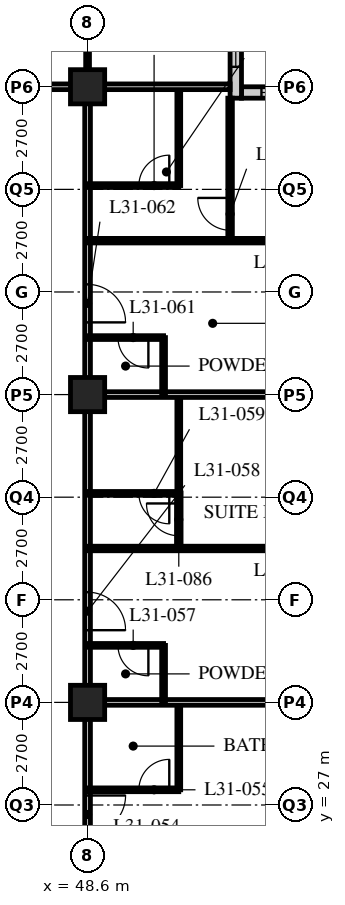
"""IFC4 building model, lengths in metres.
Left out: names, types, materials, properties, quantities, classifications, styles, units other than length and angle.
Written with IfcOpenShell. Run it as: python <this file> out.ifc"""

import sys

from ifc_helpers import new_model, si_unit, direction, frame, frame_2d, origin, origin_2d, place, context, subcontext, project, spatial, rectangle, hollow_rectangle, extrude, element, fill, save


model = new_model("IFC4")
c1 = context("Model", 3, precision=1e-05, world=origin(), true_north=direction((0.0, 1.0)))
c2 = subcontext(c1, "Body", "Model", "MODEL_VIEW")
j1 = project(units=[si_unit("LENGTHUNIT", "METRE"), si_unit("PLANEANGLEUNIT", "RADIAN")], contexts=[c1])
p1 = place(None, origin())
s1 = spatial("IfcSite", under=j1, at=p1, CompositionType="ELEMENT")
p2 = place(p1, origin())
s2 = spatial("IfcBuilding", under=s1, at=p2, CompositionType="ELEMENT")
p3 = place(p2, frame((0.0, 0.0, 123.8)))
s3 = spatial("IfcBuildingStorey", under=s2, at=p3, CompositionType="ELEMENT", Elevation=123.8)
for number, where, z_axis, x_axis in (
    (1, (48.6, 29.7, 0.0), (0.0, 0.0, 1.0), (1.0, 0.0, 0.0)),
    (2, (48.6, 37.8, 0.0), (0.0, 0.0, 1.0), (1.0, 0.0, 0.0)),
    (3, (48.6, 45.9, 0.0), (0.0, 0.0, 1.0), (1.0, 0.0, 0.0)),
):
    element("IfcColumn", number, at=place(p3, frame(where, z_axis=z_axis, x_axis=x_axis)), inside=s3, PredefinedType="COLUMN", context=c2, shape_type="SweptSolid", body=[
        extrude(hollow_rectangle(XDim=0.9, YDim=0.9, WallThickness=0.09, at=origin_2d()), origin(), (0.0, 0.0, 1.0), 3.4),
    ])
p4 = place(p3, frame((56.4, 45.75, 0.0), z_axis=(0.0, 0.0, 1.0), x_axis=(-1.0, 0.0, 0.0)))
e4 = element("IfcWall", 4, at=p4, inside=s3, PredefinedType="SOLIDWALL", context=c2, shape_type="SweptSolid", body=[
    extrude(rectangle(XDim=3.75, YDim=0.3, at=frame_2d((1.875, 0.0))), origin(), (0.0, 0.0, 1.0), 3.19),
])
p5 = place(p4, frame((0.225, 0.0, 0.9)))
e5 = element("IfcOpeningElement", 5, at=p5, cuts=e4, PredefinedType="OPENING", context=c2, shape_type="SweptSolid", body=[
    extrude(rectangle(XDim=3.0, YDim=1.5, at=frame_2d((1.5, 0.75))), frame((0.0, 0.16, 0.0), z_axis=(0.0, -1.0, 0.0), x_axis=(1.0, 0.0, 0.0)), (0.0, 0.0, 1.0), 0.32),
])
p6 = place(p3, frame((52.5, 45.6, 0.0), z_axis=(0.0, 0.0, 1.0), x_axis=(0.0, 1.0, 0.0)))
e6 = element("IfcWall", 6, at=p6, inside=s3, PredefinedType="SOLIDWALL", context=c2, shape_type="SweptSolid", body=[
    extrude(rectangle(XDim=4.35, YDim=0.3, at=frame_2d((2.175, 0.0))), origin(), (0.0, 0.0, 1.0), 3.19),
])
p7 = place(p6, frame((0.825, 0.0, 0.9)))
e7 = element("IfcOpeningElement", 7, at=p7, cuts=e6, PredefinedType="OPENING", context=c2, shape_type="SweptSolid", body=[
    extrude(rectangle(XDim=3.0, YDim=1.5, at=frame_2d((1.5, 0.75))), frame((0.0, 0.16, 0.0), z_axis=(0.0, -1.0, 0.0), x_axis=(1.0, 0.0, 0.0)), (0.0, 0.0, 1.0), 0.32),
])
p8 = place(p3, frame((8.1, 45.9, 0.0), z_axis=(0.0, 0.0, 1.0), x_axis=(1.0, 0.0, 0.0)))
e8 = element("IfcWall", 8, at=p8, inside=s3, PredefinedType="PARTITIONING", context=c2, shape_type="SweptSolid", body=[
    extrude(rectangle(XDim=40.5, YDim=0.15, at=frame_2d((20.25, 0.0))), origin(), (0.0, 0.0, 1.0), 2.578),
])
p9 = place(p8, frame((9.625, 0.0, 0.0)))
e9 = element("IfcOpeningElement", 9, at=p9, cuts=e8, PredefinedType="OPENING", context=c2, shape_type="SweptSolid", body=[
    extrude(rectangle(XDim=1.0, YDim=2.1, at=frame_2d((0.5, 1.05))), frame((0.0, 0.085, 0.0), z_axis=(0.0, -1.0, 0.0), x_axis=(1.0, 0.0, 0.0)), (0.0, 0.0, 1.0), 0.17),
])
p10 = place(p8, frame((21.65, 0.0, 0.0)))
e10 = element("IfcOpeningElement", 10, at=p10, cuts=e8, PredefinedType="OPENING", context=c2, shape_type="SweptSolid", body=[
    extrude(rectangle(XDim=1.0, YDim=2.1, at=frame_2d((0.5, 1.05))), frame((0.0, 0.085, 0.0), z_axis=(0.0, -1.0, 0.0), x_axis=(1.0, 0.0, 0.0)), (0.0, 0.0, 1.0), 0.17),
])
p11 = place(p8, frame((26.75, 0.0, 0.0)))
e11 = element("IfcOpeningElement", 11, at=p11, cuts=e8, PredefinedType="OPENING", context=c2, shape_type="SweptSolid", body=[
    extrude(rectangle(XDim=1.0, YDim=2.1, at=frame_2d((0.5, 1.05))), frame((0.0, 0.085, 0.0), z_axis=(0.0, -1.0, 0.0), x_axis=(1.0, 0.0, 0.0)), (0.0, 0.0, 1.0), 0.17),
])
p12 = place(p8, frame((28.95, 0.0, 0.0)))
e12 = element("IfcOpeningElement", 12, at=p12, cuts=e8, PredefinedType="OPENING", context=c2, shape_type="SweptSolid", body=[
    extrude(rectangle(XDim=1.0, YDim=2.1, at=frame_2d((0.5, 1.05))), frame((0.0, 0.085, 0.0), z_axis=(0.0, -1.0, 0.0), x_axis=(1.0, 0.0, 0.0)), (0.0, 0.0, 1.0), 0.17),
])
p13 = place(p8, frame((34.85, 0.0, 0.0)))
e13 = element("IfcOpeningElement", 13, at=p13, cuts=e8, PredefinedType="OPENING", context=c2, shape_type="SweptSolid", body=[
    extrude(rectangle(XDim=1.0, YDim=2.1, at=frame_2d((0.5, 1.05))), frame((0.0, 0.085, 0.0), z_axis=(0.0, -1.0, 0.0), x_axis=(1.0, 0.0, 0.0)), (0.0, 0.0, 1.0), 0.17),
])
p14 = place(p8, frame((36.875, 0.0, 0.0)))
e14 = element("IfcOpeningElement", 14, at=p14, cuts=e8, PredefinedType="OPENING", context=c2, shape_type="SweptSolid", body=[
    extrude(rectangle(XDim=1.0, YDim=2.1, at=frame_2d((0.5, 1.05))), frame((0.0, 0.085, 0.0), z_axis=(0.0, -1.0, 0.0), x_axis=(1.0, 0.0, 0.0)), (0.0, 0.0, 1.0), 0.17),
])
p15 = place(p8, frame((2.625, 0.0, 0.0)))
e15 = element("IfcOpeningElement", 15, at=p15, cuts=e8, PredefinedType="OPENING", context=c2, shape_type="SweptSolid", body=[
    extrude(rectangle(XDim=1.0, YDim=2.1, at=frame_2d((0.5, 1.05))), frame((0.0, 0.085, 0.0), z_axis=(0.0, -1.0, 0.0), x_axis=(1.0, 0.0, 0.0)), (0.0, 0.0, 1.0), 0.17),
])
p16 = place(p3, frame((48.6, 21.6, 0.0), z_axis=(0.0, 0.0, 1.0), x_axis=(0.0, 1.0, 0.0)))
e16 = element("IfcWall", 16, at=p16, inside=s3, PredefinedType="PARTITIONING", context=c2, shape_type="SweptSolid", body=[
    extrude(rectangle(XDim=24.3, YDim=0.15, at=frame_2d((12.15, 0.0))), origin(), (0.0, 0.0, 1.0), 2.578),
])
p17 = place(p16, frame((2.75, 0.0, 0.0)))
e17 = element("IfcOpeningElement", 17, at=p17, cuts=e16, PredefinedType="OPENING", context=c2, shape_type="SweptSolid", body=[
    extrude(rectangle(XDim=1.0, YDim=2.1, at=frame_2d((0.5, 1.05))), frame((0.0, 0.085, 0.0), z_axis=(0.0, -1.0, 0.0), x_axis=(1.0, 0.0, 0.0)), (0.0, 0.0, 1.0), 0.17),
])
p18 = place(p16, frame((4.65, 0.0, 0.0)))
e18 = element("IfcOpeningElement", 18, at=p18, cuts=e16, PredefinedType="OPENING", context=c2, shape_type="SweptSolid", body=[
    extrude(rectangle(XDim=1.0, YDim=2.1, at=frame_2d((0.5, 1.05))), frame((0.0, 0.085, 0.0), z_axis=(0.0, -1.0, 0.0), x_axis=(1.0, 0.0, 0.0)), (0.0, 0.0, 1.0), 0.17),
])
p19 = place(p16, frame((10.0, 0.0, 0.0)))
e19 = element("IfcOpeningElement", 19, at=p19, cuts=e16, PredefinedType="OPENING", context=c2, shape_type="SweptSolid", body=[
    extrude(rectangle(XDim=1.0, YDim=2.1, at=frame_2d((0.5, 1.05))), frame((0.0, 0.085, 0.0), z_axis=(0.0, -1.0, 0.0), x_axis=(1.0, 0.0, 0.0)), (0.0, 0.0, 1.0), 0.17),
])
p20 = place(p16, frame((18.1, 0.0, 0.0)))
e20 = element("IfcOpeningElement", 20, at=p20, cuts=e16, PredefinedType="OPENING", context=c2, shape_type="SweptSolid", body=[
    extrude(rectangle(XDim=1.0, YDim=2.1, at=frame_2d((0.5, 1.05))), frame((0.0, 0.085, 0.0), z_axis=(0.0, -1.0, 0.0), x_axis=(1.0, 0.0, 0.0)), (0.0, 0.0, 1.0), 0.17),
])
p21 = place(p3, frame((51.0, 27.4, 0.0), z_axis=(0.0, 0.0, 1.0), x_axis=(0.0, 1.0, 0.0)))
e21 = element("IfcWall", 21, at=p21, inside=s3, PredefinedType="PARTITIONING", context=c2, shape_type="SweptSolid", body=[
    extrude(rectangle(XDim=2.3, YDim=0.1, at=frame_2d((1.15, 0.0))), origin(), (0.0, 0.0, 1.0), 3.19),
])
p22 = place(p3, frame((48.6, 27.4, 0.0), z_axis=(0.0, 0.0, 1.0), x_axis=(1.0, 0.0, 0.0)))
e22 = element("IfcWall", 22, at=p22, inside=s3, PredefinedType="PARTITIONING", context=c2, shape_type="SweptSolid", body=[
    extrude(rectangle(XDim=2.4, YDim=0.1, at=frame_2d((1.2, 0.0))), origin(), (0.0, 0.0, 1.0), 3.19),
])
p23 = place(p22, frame((1.35, 0.0, 0.0)))
e23 = element("IfcOpeningElement", 23, at=p23, cuts=e22, PredefinedType="OPENING", context=c2, shape_type="SweptSolid", body=[
    extrude(rectangle(XDim=0.8, YDim=2.1, at=frame_2d((0.4, 1.05))), frame((0.0, 0.06, 0.0), z_axis=(0.0, -1.0, 0.0), x_axis=(1.0, 0.0, 0.0)), (0.0, 0.0, 1.0), 0.12),
])
p24 = place(p3, frame((48.6, 29.7, 0.0), z_axis=(0.0, 0.0, 1.0), x_axis=(1.0, 0.0, 0.0)))
e24 = element("IfcWall", 24, at=p24, inside=s3, PredefinedType="PARTITIONING", context=c2, shape_type="SweptSolid", body=[
    extrude(rectangle(XDim=7.8, YDim=0.15, at=frame_2d((3.9, 0.0))), origin(), (0.0, 0.0, 1.0), 2.578),
])
p25 = place(p3, frame((50.6, 29.7, 0.0), z_axis=(0.0, 0.0, 1.0), x_axis=(0.0, 1.0, 0.0)))
e25 = element("IfcWall", 25, at=p25, inside=s3, PredefinedType="PARTITIONING", context=c2, shape_type="SweptSolid", body=[
    extrude(rectangle(XDim=1.5, YDim=0.1, at=frame_2d((0.75, 0.0))), origin(), (0.0, 0.0, 1.0), 3.19),
])
p26 = place(p3, frame((48.6, 31.2, 0.0), z_axis=(0.0, 0.0, 1.0), x_axis=(1.0, 0.0, 0.0)))
e26 = element("IfcWall", 26, at=p26, inside=s3, PredefinedType="PARTITIONING", context=c2, shape_type="SweptSolid", body=[
    extrude(rectangle(XDim=2.0, YDim=0.1, at=frame_2d((1.0, 0.0))), origin(), (0.0, 0.0, 1.0), 3.19),
])
p27 = place(p26, frame((0.8, 0.0, 0.0)))
e27 = element("IfcOpeningElement", 27, at=p27, cuts=e26, PredefinedType="OPENING", context=c2, shape_type="SweptSolid", body=[
    extrude(rectangle(XDim=0.8, YDim=2.1, at=frame_2d((0.4, 1.05))), frame((0.0, 0.06, 0.0), z_axis=(0.0, -1.0, 0.0), x_axis=(1.0, 0.0, 0.0)), (0.0, 0.0, 1.0), 0.12),
])
p28 = place(p3, frame((51.0, 35.2, 0.0), z_axis=(0.0, 0.0, 1.0), x_axis=(0.0, 1.0, 0.0)))
e28 = element("IfcWall", 28, at=p28, inside=s3, PredefinedType="PARTITIONING", context=c2, shape_type="SweptSolid", body=[
    extrude(rectangle(XDim=2.6, YDim=0.1, at=frame_2d((1.3, 0.0))), origin(), (0.0, 0.0, 1.0), 3.19),
])
p29 = place(p3, frame((48.6, 35.2, 0.0), z_axis=(0.0, 0.0, 1.0), x_axis=(1.0, 0.0, 0.0)))
e29 = element("IfcWall", 29, at=p29, inside=s3, PredefinedType="PARTITIONING", context=c2, shape_type="SweptSolid", body=[
    extrude(rectangle(XDim=2.4, YDim=0.1, at=frame_2d((1.2, 0.0))), origin(), (0.0, 0.0, 1.0), 3.19),
])
p30 = place(p29, frame((1.35, 0.0, 0.0)))
e30 = element("IfcOpeningElement", 30, at=p30, cuts=e29, PredefinedType="OPENING", context=c2, shape_type="SweptSolid", body=[
    extrude(rectangle(XDim=0.8, YDim=2.1, at=frame_2d((0.4, 1.05))), frame((0.0, 0.06, 0.0), z_axis=(0.0, -1.0, 0.0), x_axis=(1.0, 0.0, 0.0)), (0.0, 0.0, 1.0), 0.12),
])
p31 = place(p3, frame((48.6, 33.75, 0.0), z_axis=(0.0, 0.0, 1.0), x_axis=(1.0, 0.0, 0.0)))
e31 = element("IfcWall", 31, at=p31, inside=s3, PredefinedType="PARTITIONING", context=c2, shape_type="SweptSolid", body=[
    extrude(rectangle(XDim=7.8, YDim=0.12, at=frame_2d((3.9, 0.0))), origin(), (0.0, 0.0, 1.0), 3.19),
])
p32 = place(p31, frame((4.825, 0.0, 0.0)))
e32 = element("IfcOpeningElement", 32, at=p32, cuts=e31, PredefinedType="OPENING", context=c2, shape_type="SweptSolid", body=[
    extrude(rectangle(XDim=0.85, YDim=2.1, at=frame_2d((0.425, 1.05))), frame((0.0, 0.07, 0.0), z_axis=(0.0, -1.0, 0.0), x_axis=(1.0, 0.0, 0.0)), (0.0, 0.0, 1.0), 0.14),
])
p33 = place(p3, frame((48.6, 37.8, 0.0), z_axis=(0.0, 0.0, 1.0), x_axis=(1.0, 0.0, 0.0)))
e33 = element("IfcWall", 33, at=p33, inside=s3, PredefinedType="PARTITIONING", context=c2, shape_type="SweptSolid", body=[
    extrude(rectangle(XDim=7.8, YDim=0.15, at=frame_2d((3.9, 0.0))), origin(), (0.0, 0.0, 1.0), 2.578),
])
p34 = place(p3, frame((50.6, 37.8, 0.0), z_axis=(0.0, 0.0, 1.0), x_axis=(0.0, 1.0, 0.0)))
e34 = element("IfcWall", 34, at=p34, inside=s3, PredefinedType="PARTITIONING", context=c2, shape_type="SweptSolid", body=[
    extrude(rectangle(XDim=1.5, YDim=0.1, at=frame_2d((0.75, 0.0))), origin(), (0.0, 0.0, 1.0), 3.19),
])
p35 = place(p3, frame((48.6, 39.3, 0.0), z_axis=(0.0, 0.0, 1.0), x_axis=(1.0, 0.0, 0.0)))
e35 = element("IfcWall", 35, at=p35, inside=s3, PredefinedType="PARTITIONING", context=c2, shape_type="SweptSolid", body=[
    extrude(rectangle(XDim=2.0, YDim=0.1, at=frame_2d((1.0, 0.0))), origin(), (0.0, 0.0, 1.0), 3.19),
])
p36 = place(p35, frame((0.8, 0.0, 0.0)))
e36 = element("IfcOpeningElement", 36, at=p36, cuts=e35, PredefinedType="OPENING", context=c2, shape_type="SweptSolid", body=[
    extrude(rectangle(XDim=0.8, YDim=2.1, at=frame_2d((0.4, 1.05))), frame((0.0, 0.06, 0.0), z_axis=(0.0, -1.0, 0.0), x_axis=(1.0, 0.0, 0.0)), (0.0, 0.0, 1.0), 0.12),
])
p37 = place(p3, frame((51.0, 43.3, 0.0), z_axis=(0.0, 0.0, 1.0), x_axis=(0.0, 1.0, 0.0)))
e37 = element("IfcWall", 37, at=p37, inside=s3, PredefinedType="PARTITIONING", context=c2, shape_type="SweptSolid", body=[
    extrude(rectangle(XDim=2.6, YDim=0.1, at=frame_2d((1.3, 0.0))), origin(), (0.0, 0.0, 1.0), 3.19),
])
p38 = place(p3, frame((48.6, 43.3, 0.0), z_axis=(0.0, 0.0, 1.0), x_axis=(1.0, 0.0, 0.0)))
e38 = element("IfcWall", 38, at=p38, inside=s3, PredefinedType="PARTITIONING", context=c2, shape_type="SweptSolid", body=[
    extrude(rectangle(XDim=2.4, YDim=0.1, at=frame_2d((1.2, 0.0))), origin(), (0.0, 0.0, 1.0), 3.19),
])
p39 = place(p38, frame((1.35, 0.0, 0.0)))
e39 = element("IfcOpeningElement", 39, at=p39, cuts=e38, PredefinedType="OPENING", context=c2, shape_type="SweptSolid", body=[
    extrude(rectangle(XDim=0.8, YDim=2.1, at=frame_2d((0.4, 1.05))), frame((0.0, 0.06, 0.0), z_axis=(0.0, -1.0, 0.0), x_axis=(1.0, 0.0, 0.0)), (0.0, 0.0, 1.0), 0.12),
])
p40 = place(p3, frame((48.6, 41.85, 0.0), z_axis=(0.0, 0.0, 1.0), x_axis=(1.0, 0.0, 0.0)))
e40 = element("IfcWall", 40, at=p40, inside=s3, PredefinedType="PARTITIONING", context=c2, shape_type="SweptSolid", body=[
    extrude(rectangle(XDim=7.8, YDim=0.12, at=frame_2d((3.9, 0.0))), origin(), (0.0, 0.0, 1.0), 3.19),
])
p41 = place(p40, frame((4.825, 0.0, 0.0)))
e41 = element("IfcOpeningElement", 41, at=p41, cuts=e40, PredefinedType="OPENING", context=c2, shape_type="SweptSolid", body=[
    extrude(rectangle(XDim=0.85, YDim=2.1, at=frame_2d((0.425, 1.05))), frame((0.0, 0.07, 0.0), z_axis=(0.0, -1.0, 0.0), x_axis=(1.0, 0.0, 0.0)), (0.0, 0.0, 1.0), 0.14),
])
p42 = place(p3, frame((48.6, 45.9, 0.0), z_axis=(0.0, 0.0, 1.0), x_axis=(0.0, 1.0, 0.0)))
e42 = element("IfcWall", 42, at=p42, inside=s3, PredefinedType="PARTITIONING", context=c2, shape_type="SweptSolid", body=[
    extrude(rectangle(XDim=2.4, YDim=0.1, at=frame_2d((1.2, 0.0))), origin(), (0.0, 0.0, 1.0), 2.578),
])
p43 = place(p3, frame((48.6, 45.9, 0.0), z_axis=(0.0, 0.0, 1.0), x_axis=(1.0, 0.0, 0.0)))
e43 = element("IfcWall", 43, at=p43, inside=s3, PredefinedType="PARTITIONING", context=c2, shape_type="SweptSolid", body=[
    extrude(rectangle(XDim=3.75, YDim=0.15, at=frame_2d((1.875, 0.0))), origin(), (0.0, 0.0, 1.0), 2.578),
])
p44 = place(p3, frame((51.0, 35.21, 0.0), z_axis=(0.0, 0.0, 1.0), x_axis=(0.0, -1.0, 0.0)))
e44 = element("IfcWall", 44, at=p44, inside=s3, PredefinedType="PARTITIONING", context=c2, shape_type="SweptSolid", body=[
    extrude(rectangle(XDim=1.46, YDim=0.12, at=frame_2d((0.73, 0.0))), origin(), (0.0, 0.0, 1.0), 3.19),
])
p45 = place(p44, frame((0.275, 0.0, 0.0)))
e45 = element("IfcOpeningElement", 45, at=p45, cuts=e44, PredefinedType="OPENING", context=c2, shape_type="SweptSolid", body=[
    extrude(rectangle(XDim=0.85, YDim=2.1, at=frame_2d((0.425, 1.05))), frame((0.0, 0.07, 0.0), z_axis=(0.0, -1.0, 0.0), x_axis=(1.0, 0.0, 0.0)), (0.0, 0.0, 1.0), 0.14),
])
p46 = place(p3, frame((52.35, 45.6, 0.0), z_axis=(0.0, 0.0, 1.0), x_axis=(0.0, -1.0, 0.0)))
e46 = element("IfcWall", 46, at=p46, inside=s3, PredefinedType="PARTITIONING", context=c2, shape_type="SweptSolid", body=[
    extrude(rectangle(XDim=3.75, YDim=0.12, at=frame_2d((1.875, 0.0))), origin(), (0.0, 0.0, 1.0), 3.19),
])
p47 = place(p46, frame((2.625, 0.0, 0.0)))
e47 = element("IfcOpeningElement", 47, at=p47, cuts=e46, PredefinedType="OPENING", context=c2, shape_type="SweptSolid", body=[
    extrude(rectangle(XDim=0.85, YDim=2.1, at=frame_2d((0.425, 1.05))), frame((0.0, 0.07, 0.0), z_axis=(0.0, -1.0, 0.0), x_axis=(1.0, 0.0, 0.0)), (0.0, 0.0, 1.0), 0.14),
])
p48 = place(p5, origin())
e48 = element("IfcWindow", 48, at=p48, inside=s3, PartitioningType="SINGLE_PANEL", PredefinedType="WINDOW", context=c2, shape_type="SweptSolid", body=[
    extrude(rectangle(XDim=3.0, YDim=1.5, at=frame_2d((1.5, 0.75))), frame((0.0, 0.03, 0.0), z_axis=(0.0, -1.0, 0.0), x_axis=(1.0, 0.0, 0.0)), (0.0, 0.0, 1.0), 0.06),
])
fill(e5, e48)
p49 = place(p7, origin())
e49 = element("IfcWindow", 49, at=p49, inside=s3, PartitioningType="SINGLE_PANEL", PredefinedType="WINDOW", context=c2, shape_type="SweptSolid", body=[
    extrude(rectangle(XDim=3.0, YDim=1.5, at=frame_2d((1.5, 0.75))), frame((0.0, 0.03, 0.0), z_axis=(0.0, -1.0, 0.0), x_axis=(1.0, 0.0, 0.0)), (0.0, 0.0, 1.0), 0.06),
])
fill(e7, e49)
p50 = place(p23, origin())
e50 = element("IfcDoor", 50, at=p50, inside=s3, OperationType="SINGLE_SWING_RIGHT", PredefinedType="DOOR", context=c2, shape_type="SweptSolid", body=[
    extrude(rectangle(XDim=0.8, YDim=2.1, at=frame_2d((0.4, 1.05))), frame((0.0, 0.025, 0.0), z_axis=(0.0, -1.0, 0.0), x_axis=(1.0, 0.0, 0.0)), (0.0, 0.0, 1.0), 0.05),
])
fill(e23, e50)
p51 = place(p18, origin())
e51 = element("IfcDoor", 51, at=p51, inside=s3, OperationType="SINGLE_SWING_LEFT", PredefinedType="DOOR", context=c2, shape_type="SweptSolid", body=[
    extrude(rectangle(XDim=1.0, YDim=2.1, at=frame_2d((0.5, 1.05))), frame((0.0, 0.025, 0.0), z_axis=(0.0, -1.0, 0.0), x_axis=(1.0, 0.0, 0.0)), (0.0, 0.0, 1.0), 0.05),
])
fill(e18, e51)
p52 = place(p27, origin())
e52 = element("IfcDoor", 52, at=p52, inside=s3, OperationType="SINGLE_SWING_LEFT", PredefinedType="DOOR", context=c2, shape_type="SweptSolid", body=[
    extrude(rectangle(XDim=0.8, YDim=2.1, at=frame_2d((0.4, 1.05))), frame((0.0, 0.025, 0.0), z_axis=(0.0, -1.0, 0.0), x_axis=(1.0, 0.0, 0.0)), (0.0, 0.0, 1.0), 0.05),
])
fill(e27, e52)
p53 = place(p19, origin())
e53 = element("IfcDoor", 53, at=p53, inside=s3, OperationType="SINGLE_SWING_RIGHT", PredefinedType="DOOR", context=c2, shape_type="SweptSolid", body=[
    extrude(rectangle(XDim=1.0, YDim=2.1, at=frame_2d((0.5, 1.05))), frame((0.0, 0.025, 0.0), z_axis=(0.0, -1.0, 0.0), x_axis=(1.0, 0.0, 0.0)), (0.0, 0.0, 1.0), 0.05),
])
fill(e19, e53)
p54 = place(p30, origin())
e54 = element("IfcDoor", 54, at=p54, inside=s3, OperationType="SINGLE_SWING_LEFT", PredefinedType="DOOR", context=c2, shape_type="SweptSolid", body=[
    extrude(rectangle(XDim=0.8, YDim=2.1, at=frame_2d((0.4, 1.05))), frame((0.0, 0.025, 0.0), z_axis=(0.0, -1.0, 0.0), x_axis=(1.0, 0.0, 0.0)), (0.0, 0.0, 1.0), 0.05),
])
fill(e30, e54)
p55 = place(p36, origin())
e55 = element("IfcDoor", 55, at=p55, inside=s3, OperationType="SINGLE_SWING_LEFT", PredefinedType="DOOR", context=c2, shape_type="SweptSolid", body=[
    extrude(rectangle(XDim=0.8, YDim=2.1, at=frame_2d((0.4, 1.05))), frame((0.0, 0.025, 0.0), z_axis=(0.0, -1.0, 0.0), x_axis=(1.0, 0.0, 0.0)), (0.0, 0.0, 1.0), 0.05),
])
fill(e36, e55)
p56 = place(p20, origin())
e56 = element("IfcDoor", 56, at=p56, inside=s3, OperationType="SINGLE_SWING_RIGHT", PredefinedType="DOOR", context=c2, shape_type="SweptSolid", body=[
    extrude(rectangle(XDim=1.0, YDim=2.1, at=frame_2d((0.5, 1.05))), frame((0.0, 0.025, 0.0), z_axis=(0.0, -1.0, 0.0), x_axis=(1.0, 0.0, 0.0)), (0.0, 0.0, 1.0), 0.05),
])
fill(e20, e56)
p57 = place(p39, origin())
e57 = element("IfcDoor", 57, at=p57, inside=s3, OperationType="SINGLE_SWING_RIGHT", PredefinedType="DOOR", context=c2, shape_type="SweptSolid", body=[
    extrude(rectangle(XDim=0.8, YDim=2.1, at=frame_2d((0.4, 1.05))), frame((0.0, 0.025, 0.0), z_axis=(0.0, -1.0, 0.0), x_axis=(1.0, 0.0, 0.0)), (0.0, 0.0, 1.0), 0.05),
])
fill(e39, e57)
p58 = place(p45, origin())
e58 = element("IfcDoor", 58, at=p58, inside=s3, OperationType="SINGLE_SWING_RIGHT", PredefinedType="DOOR", context=c2, shape_type="SweptSolid", body=[
    extrude(rectangle(XDim=0.85, YDim=2.1, at=frame_2d((0.425, 1.05))), frame((0.0, 0.025, 0.0), z_axis=(0.0, -1.0, 0.0), x_axis=(1.0, 0.0, 0.0)), (0.0, 0.0, 1.0), 0.05),
])
fill(e45, e58)
p59 = place(p47, origin())
e59 = element("IfcDoor", 59, at=p59, inside=s3, OperationType="SINGLE_SWING_RIGHT", PredefinedType="DOOR", context=c2, shape_type="SweptSolid", body=[
    extrude(rectangle(XDim=0.85, YDim=2.1, at=frame_2d((0.425, 1.05))), frame((0.0, 0.025, 0.0), z_axis=(0.0, -1.0, 0.0), x_axis=(1.0, 0.0, 0.0)), (0.0, 0.0, 1.0), 0.05),
])
fill(e47, e59)
save(model, sys.argv[1])
